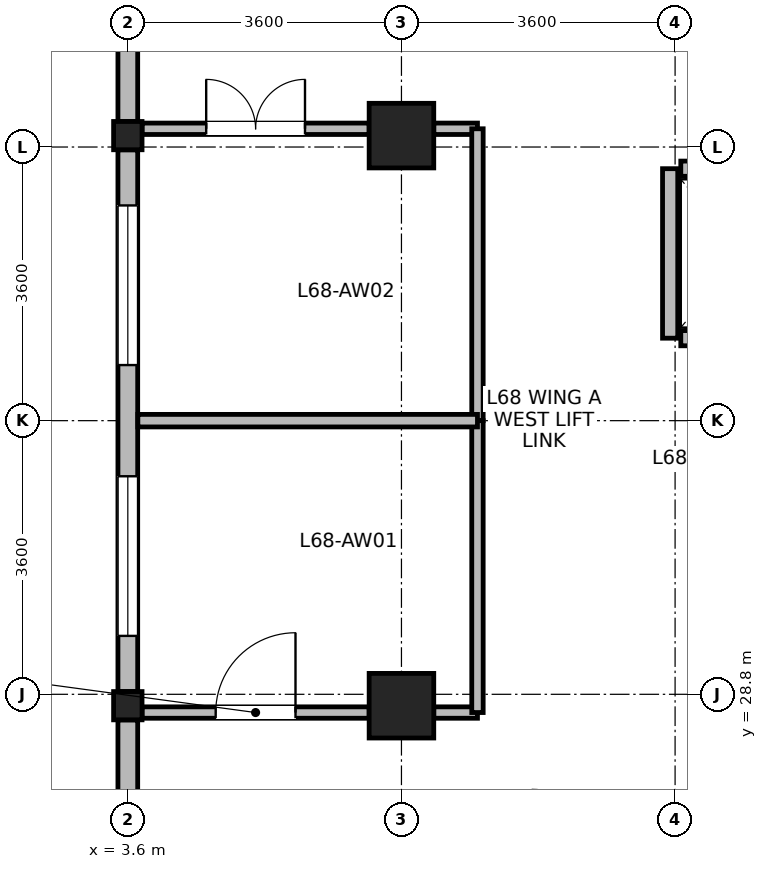
"""IFC4 building model, lengths in metres.
Left out: names, types, materials, properties, quantities, classifications, styles, units other than length and angle.
Written with IfcOpenShell. Run it as: python <this file> out.ifc"""

import sys

from ifc_helpers import new_model, si_unit, direction, frame, frame_2d, origin, origin_2d, place, context, subcontext, project, spatial, rectangle, i_section, extrude, source, transform, mapped, element, fill, save


model = new_model("IFC4")
c1 = context("Model", 3, precision=1e-05, world=origin(), true_north=direction((0.0, 1.0)))
c2 = subcontext(c1, "Body", "Model", "MODEL_VIEW")
j1 = project(units=[si_unit("LENGTHUNIT", "METRE"), si_unit("PLANEANGLEUNIT", "RADIAN")], contexts=[c1])
p1 = place(None, origin())
s1 = spatial("IfcSite", under=j1, at=p1, CompositionType="ELEMENT")
p2 = place(p1, origin())
s2 = spatial("IfcBuilding", under=s1, at=p2, CompositionType="ELEMENT")
p3 = place(p2, frame((0.0, 0.0, 264.7)))
s3 = spatial("IfcBuildingStorey", under=s2, at=p3, CompositionType="ELEMENT", Elevation=264.7)
m1 = source(origin(), c2, "Body", "SweptSolid", [
    extrude(rectangle(XDim=0.85, YDim=0.85, at=origin_2d()), origin(), (0.0, 0.0, 1.0), 3.7),
])
for number, where, z_axis, x_axis in (
    (1, (7.2, 28.65, 0.0), (0.0, 0.0, 1.0), (1.0, 0.0, 0.0)),
    (2, (7.2, 36.15, 0.0), (0.0, 0.0, 1.0), (1.0, 0.0, 0.0)),
):
    element("IfcColumn", number, at=place(p3, frame(where, z_axis=z_axis, x_axis=x_axis)), inside=s3, PredefinedType="COLUMN", context=c2, shape_type="MappedRepresentation", body=[
        mapped(m1, transform((0.0, 0.0, 0.0), x_axis=(1.0, 0.0, 0.0), y_axis=(0.0, 1.0, 0.0), z_axis=(0.0, 0.0, 1.0), scale=1.0)),
    ])
m2 = source(origin(), c2, "Body", "SweptSolid", [
    extrude(i_section(OverallWidth=0.374, OverallDepth=0.372, WebThickness=0.015, FlangeThickness=0.026, FilletRadius=0.015, at=origin_2d()), origin(), (0.0, 0.0, 1.0), 3.7),
])
for number, where, z_axis, x_axis in (
    (3, (3.6, 28.65, 0.0), (0.0, 0.0, 1.0), (1.0, 0.0, 0.0)),
    (4, (3.6, 36.15, 0.0), (0.0, 0.0, 1.0), (1.0, 0.0, 0.0)),
):
    element("IfcColumn", number, at=place(p3, frame(where, z_axis=z_axis, x_axis=x_axis)), inside=s3, PredefinedType="COLUMN", context=c2, shape_type="MappedRepresentation", body=[
        mapped(m2, transform((0.0, 0.0, 0.0), x_axis=(1.0, 0.0, 0.0), y_axis=(0.0, 1.0, 0.0), z_axis=(0.0, 0.0, 1.0), scale=1.0)),
    ])
p4 = place(p3, frame((3.6, 36.337, 0.0), z_axis=(0.0, 0.0, 1.0), x_axis=(0.0, 1.0, 0.0)))
e5 = element("IfcWall", 5, at=p4, inside=s3, PredefinedType="STANDARD", context=c2, shape_type="SweptSolid", body=[
    extrude(rectangle(XDim=6.993, YDim=0.26, at=frame_2d((3.497, 0.0))), origin(), (0.0, 0.0, 1.0), 3.455),
])
p5 = place(p4, frame((4.195, 0.0, 0.85)))
e6 = element("IfcOpeningElement", 6, at=p5, cuts=e5, PredefinedType="OPENING", context=c2, shape_type="SweptSolid", body=[
    extrude(rectangle(XDim=2.1, YDim=1.95, at=frame_2d((1.05, 0.975))), frame((0.0, 0.14, 0.0), z_axis=(0.0, -1.0, 0.0), x_axis=(1.0, 0.0, 0.0)), (0.0, 0.0, 1.0), 0.28),
])
p6 = place(p4, frame((2.462, 0.0, 0.85)))
e7 = element("IfcOpeningElement", 7, at=p6, cuts=e5, PredefinedType="OPENING", context=c2, shape_type="SweptSolid", body=[
    extrude(rectangle(XDim=0.95, YDim=1.75, at=frame_2d((0.475, 0.875))), frame((0.0, 0.14, 0.0), z_axis=(0.0, -1.0, 0.0), x_axis=(1.0, 0.0, 0.0)), (0.0, 0.0, 1.0), 0.28),
])
p7 = place(p3, frame((3.6, 28.837, 0.0), z_axis=(0.0, 0.0, 1.0), x_axis=(0.0, 1.0, 0.0)))
e8 = element("IfcWall", 8, at=p7, inside=s3, PredefinedType="STANDARD", context=c2, shape_type="SweptSolid", body=[
    extrude(rectangle(XDim=7.126, YDim=0.26, at=frame_2d((3.563, 0.0))), origin(), (0.0, 0.0, 1.0), 3.055),
])
p8 = place(p7, frame((0.731, 0.0, 0.85)))
e9 = element("IfcOpeningElement", 9, at=p8, cuts=e8, PredefinedType="OPENING", context=c2, shape_type="SweptSolid", body=[
    extrude(rectangle(XDim=2.1, YDim=1.95, at=frame_2d((1.05, 0.975))), frame((0.0, 0.14, 0.0), z_axis=(0.0, -1.0, 0.0), x_axis=(1.0, 0.0, 0.0)), (0.0, 0.0, 1.0), 0.28),
])
p9 = place(p7, frame((4.294, 0.0, 0.85)))
e10 = element("IfcOpeningElement", 10, at=p9, cuts=e8, PredefinedType="OPENING", context=c2, shape_type="SweptSolid", body=[
    extrude(rectangle(XDim=2.1, YDim=1.95, at=frame_2d((1.05, 0.975))), frame((0.0, 0.14, 0.0), z_axis=(0.0, -1.0, 0.0), x_axis=(1.0, 0.0, 0.0)), (0.0, 0.0, 1.0), 0.28),
])
p10 = place(p3, frame((3.6, 21.47, 0.0), z_axis=(0.0, 0.0, 1.0), x_axis=(0.0, 1.0, 0.0)))
e11 = element("IfcWall", 11, at=p10, inside=s3, PredefinedType="STANDARD", context=c2, shape_type="SweptSolid", body=[
    extrude(rectangle(XDim=6.993, YDim=0.26, at=frame_2d((3.497, 0.0))), origin(), (0.0, 0.0, 1.0), 3.455),
])
p11 = place(p10, frame((3.021, 0.0, 0.85)))
e12 = element("IfcOpeningElement", 12, at=p11, cuts=e11, PredefinedType="OPENING", context=c2, shape_type="SweptSolid", body=[
    extrude(rectangle(XDim=0.95, YDim=1.75, at=frame_2d((0.475, 0.875))), frame((0.0, 0.14, 0.0), z_axis=(0.0, -1.0, 0.0), x_axis=(1.0, 0.0, 0.0)), (0.0, 0.0, 1.0), 0.28),
])
p12 = place(p3, frame((10.875, 33.485, 0.0), z_axis=(0.0, 0.0, 1.0), x_axis=(1.0, 0.0, 0.0)))
e13 = element("IfcWall", 13, at=p12, inside=s3, PredefinedType="PARTITIONING", context=c2, shape_type="SweptSolid", body=[
    extrude(rectangle(XDim=1.65, YDim=0.2, at=frame_2d((0.825, 0.0))), origin(), (0.0, 0.0, 1.0), 3.455),
])
p13 = place(p12, frame((0.275, 0.0, 0.0)))
e14 = element("IfcOpeningElement", 14, at=p13, cuts=e13, PredefinedType="OPENING", context=c2, shape_type="SweptSolid", body=[
    extrude(rectangle(XDim=1.1, YDim=2.12, at=frame_2d((0.55, 1.06))), frame((0.0, 0.11, 0.0), z_axis=(0.0, -1.0, 0.0), x_axis=(1.0, 0.0, 0.0)), (0.0, 0.0, 1.0), 0.22),
])
p14 = place(p3, frame((10.875, 35.715, 0.0), z_axis=(0.0, 0.0, 1.0), x_axis=(1.0, 0.0, 0.0)))
e15 = element("IfcWall", 15, at=p14, inside=s3, PredefinedType="PARTITIONING", context=c2, shape_type="SweptSolid", body=[
    extrude(rectangle(XDim=1.65, YDim=0.2, at=frame_2d((0.825, 0.0))), origin(), (0.0, 0.0, 1.0), 3.455),
])
p15 = place(p3, frame((10.735, 33.485, 0.0), z_axis=(0.0, 0.0, 1.0), x_axis=(0.0, 1.0, 0.0)))
e16 = element("IfcWall", 16, at=p15, inside=s3, PredefinedType="PARTITIONING", context=c2, shape_type="SweptSolid", body=[
    extrude(rectangle(XDim=2.23, YDim=0.2, at=frame_2d((1.115, 0.0))), origin(), (0.0, 0.0, 1.0), 3.455),
])
p16 = place(p3, frame((3.787, 28.56, 0.0), z_axis=(0.0, 0.0, 1.0), x_axis=(1.0, 0.0, 0.0)))
e17 = element("IfcWall", 17, at=p16, inside=s3, PredefinedType="PARTITIONING", context=c2, shape_type="SweptSolid", body=[
    extrude(rectangle(XDim=2.988, YDim=0.15, at=frame_2d((1.494, 0.0))), origin(), (0.0, 0.0, 1.0), 2.905),
])
p17 = place(p16, frame((0.969, 0.0, 0.0)))
e18 = element("IfcOpeningElement", 18, at=p17, cuts=e17, PredefinedType="OPENING", context=c2, shape_type="SweptSolid", body=[
    extrude(rectangle(XDim=1.05, YDim=2.12, at=frame_2d((0.525, 1.06))), frame((0.0, 0.085, 0.0), z_axis=(0.0, -1.0, 0.0), x_axis=(1.0, 0.0, 0.0)), (0.0, 0.0, 1.0), 0.17),
])
p18 = place(p3, frame((7.625, 28.56, 0.0), z_axis=(0.0, 0.0, 1.0), x_axis=(1.0, 0.0, 0.0)))
e19 = element("IfcWall", 19, at=p18, inside=s3, PredefinedType="PARTITIONING", context=c2, shape_type="SweptSolid", body=[
    extrude(rectangle(XDim=0.575, YDim=0.15, at=frame_2d((0.288, 0.0))), origin(), (0.0, 0.0, 1.0), 2.905),
])
p19 = place(p3, frame((3.787, 36.24, 0.0), z_axis=(0.0, 0.0, 1.0), x_axis=(1.0, 0.0, 0.0)))
e20 = element("IfcWall", 20, at=p19, inside=s3, PredefinedType="PARTITIONING", context=c2, shape_type="SweptSolid", body=[
    extrude(rectangle(XDim=2.988, YDim=0.15, at=frame_2d((1.494, 0.0))), origin(), (0.0, 0.0, 1.0), 2.905),
])
p20 = place(p19, frame((0.844, 0.0, 0.0)))
e21 = element("IfcOpeningElement", 21, at=p20, cuts=e20, PredefinedType="OPENING", context=c2, shape_type="SweptSolid", body=[
    extrude(rectangle(XDim=1.3, YDim=2.12, at=frame_2d((0.65, 1.06))), frame((0.0, 0.085, 0.0), z_axis=(0.0, -1.0, 0.0), x_axis=(1.0, 0.0, 0.0)), (0.0, 0.0, 1.0), 0.17),
])
p21 = place(p3, frame((7.625, 36.24, 0.0), z_axis=(0.0, 0.0, 1.0), x_axis=(1.0, 0.0, 0.0)))
e22 = element("IfcWall", 22, at=p21, inside=s3, PredefinedType="PARTITIONING", context=c2, shape_type="SweptSolid", body=[
    extrude(rectangle(XDim=0.575, YDim=0.15, at=frame_2d((0.288, 0.0))), origin(), (0.0, 0.0, 1.0), 2.905),
])
p22 = place(p3, frame((8.2, 32.4, 0.0), z_axis=(0.0, 0.0, 1.0), x_axis=(0.0, 1.0, 0.0)))
e23 = element("IfcWall", 23, at=p22, inside=s3, PredefinedType="PARTITIONING", context=c2, shape_type="SweptSolid", body=[
    extrude(rectangle(XDim=3.84, YDim=0.15, at=frame_2d((1.92, 0.0))), origin(), (0.0, 0.0, 1.0), 3.455),
])
p23 = place(p3, frame((8.2, 28.56, 0.0), z_axis=(0.0, 0.0, 1.0), x_axis=(0.0, 1.0, 0.0)))
e24 = element("IfcWall", 24, at=p23, inside=s3, PredefinedType="PARTITIONING", context=c2, shape_type="SweptSolid", body=[
    extrude(rectangle(XDim=3.84, YDim=0.15, at=frame_2d((1.92, 0.0))), origin(), (0.0, 0.0, 1.0), 3.455),
])
p24 = place(p3, frame((3.732, 32.4, 0.0), z_axis=(0.0, 0.0, 1.0), x_axis=(1.0, 0.0, 0.0)))
e25 = element("IfcWall", 25, at=p24, inside=s3, PredefinedType="PARTITIONING", context=c2, shape_type="SweptSolid", body=[
    extrude(rectangle(XDim=4.468, YDim=0.165, at=frame_2d((2.234, 0.0))), origin(), (0.0, 0.0, 1.0), 3.455),
])
p25 = place(p8, origin())
e26 = element("IfcWindow", 26, at=p25, inside=s3, PartitioningType="SINGLE_PANEL", PredefinedType="WINDOW", context=c2, shape_type="SweptSolid", body=[
    extrude(rectangle(XDim=2.1, YDim=1.95, at=frame_2d((1.05, 0.975))), frame((0.0, 0.03, 0.0), z_axis=(0.0, -1.0, 0.0), x_axis=(1.0, 0.0, 0.0)), (0.0, 0.0, 1.0), 0.06),
])
fill(e9, e26)
p26 = place(p9, origin())
e27 = element("IfcWindow", 27, at=p26, inside=s3, PartitioningType="SINGLE_PANEL", PredefinedType="WINDOW", context=c2, shape_type="SweptSolid", body=[
    extrude(rectangle(XDim=2.1, YDim=1.95, at=frame_2d((1.05, 0.975))), frame((0.0, 0.03, 0.0), z_axis=(0.0, -1.0, 0.0), x_axis=(1.0, 0.0, 0.0)), (0.0, 0.0, 1.0), 0.06),
])
fill(e10, e27)
p27 = place(p17, origin())
e28 = element("IfcDoor", 28, at=p27, inside=s3, OperationType="SINGLE_SWING_RIGHT", PredefinedType="DOOR", context=c2, shape_type="SweptSolid", body=[
    extrude(rectangle(XDim=1.05, YDim=2.12, at=frame_2d((0.525, 1.06))), frame((0.0, 0.025, 0.0), z_axis=(0.0, -1.0, 0.0), x_axis=(1.0, 0.0, 0.0)), (0.0, 0.0, 1.0), 0.05),
])
fill(e18, e28)
p28 = place(p20, origin())
e29 = element("IfcDoor", 29, at=p28, inside=s3, OperationType="DOUBLE_DOOR_SINGLE_SWING", PredefinedType="DOOR", context=c2, shape_type="SweptSolid", body=[
    extrude(rectangle(XDim=1.3, YDim=2.12, at=frame_2d((0.65, 1.06))), frame((0.0, 0.025, 0.0), z_axis=(0.0, -1.0, 0.0), x_axis=(1.0, 0.0, 0.0)), (0.0, 0.0, 1.0), 0.05),
])
fill(e21, e29)
save(model, sys.argv[1])
